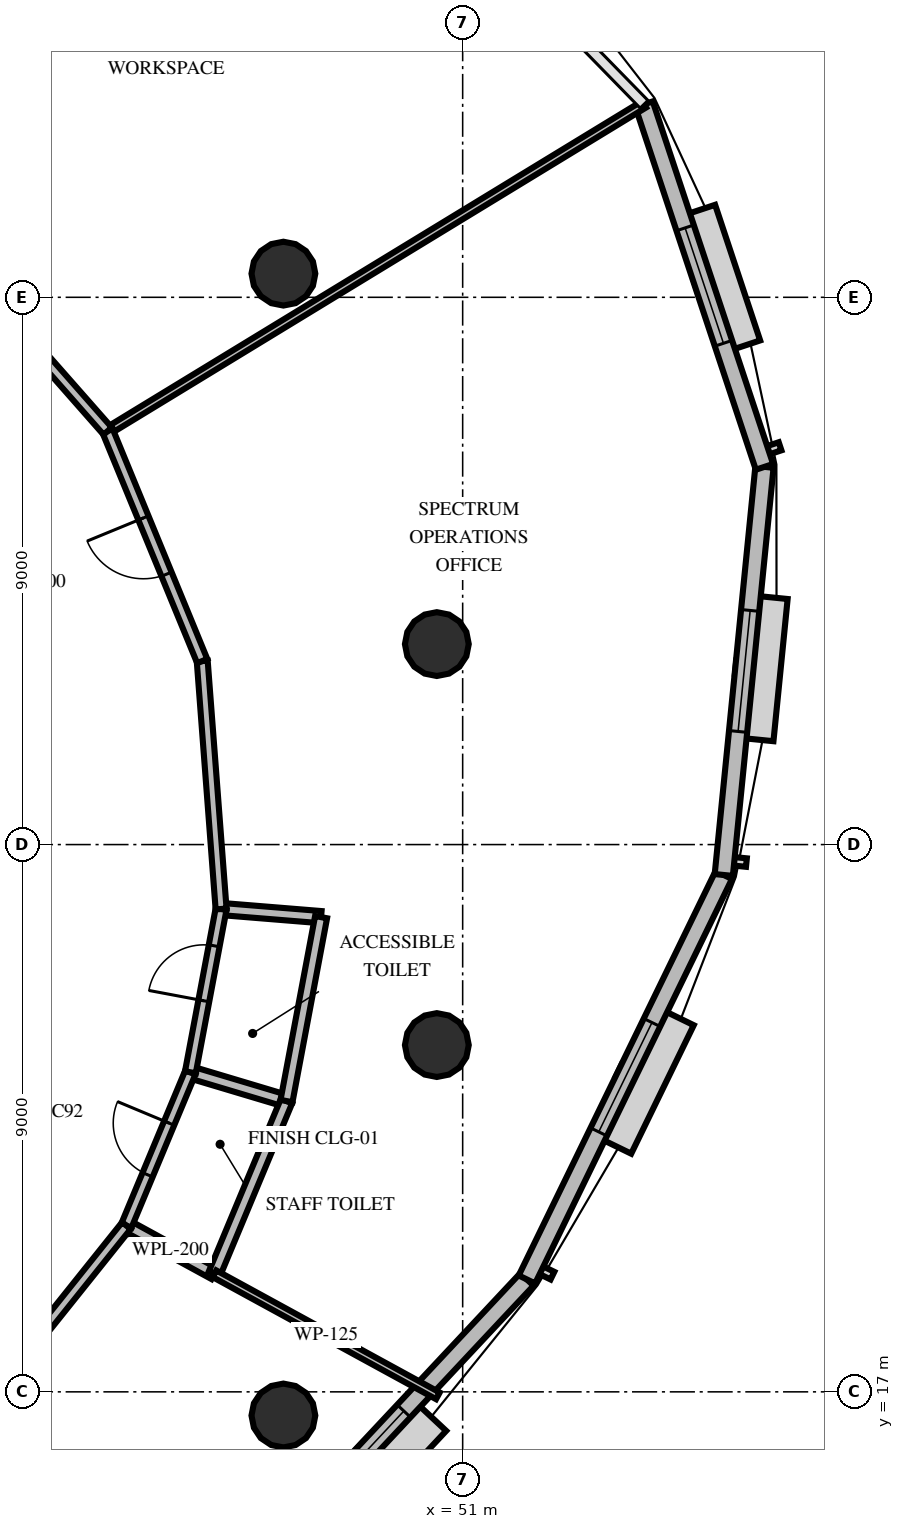
"""IFC4 building model, lengths in metres.
Left out: names, types, materials, properties, quantities, classifications, styles, units other than length and angle.
Written with IfcOpenShell. Run it as: python <this file> out.ifc"""

import sys

from ifc_helpers import new_model, si_unit, direction, frame, frame_2d, origin, origin_2d, place, context, subcontext, project, spatial, rectangle, circle, extrude, element, fill, save


model = new_model("IFC4")
c1 = context("Model", 3, precision=1e-05, world=origin(), true_north=direction((0.0, 1.0)))
c2 = subcontext(c1, "Body", "Model", "MODEL_VIEW")
j1 = project(units=[si_unit("LENGTHUNIT", "METRE"), si_unit("PLANEANGLEUNIT", "RADIAN")], contexts=[c1])
p1 = place(None, origin())
s1 = spatial("IfcSite", under=j1, at=p1, CompositionType="ELEMENT")
p2 = place(p1, origin())
s2 = spatial("IfcBuilding", under=s1, at=p2, CompositionType="ELEMENT")
p3 = place(p2, frame((0.0, 0.0, 166.4)))
s3 = spatial("IfcBuildingStorey", under=s2, at=p3, CompositionType="ELEMENT", Elevation=166.4)
for number, where, z_axis, x_axis in (
    (1, (50.575, 29.297, 0.0), (0.0, 0.0, 1.0), (1.0, 0.0, 0.0)),
    (2, (48.052, 35.389, 0.0), (0.0, 0.0, 1.0), (1.0, 0.0, 0.0)),
    (3, (48.052, 16.611, 0.0), (0.0, 0.0, 1.0), (1.0, 0.0, 0.0)),
    (4, (50.575, 22.703, 0.0), (0.0, 0.0, 1.0), (1.0, 0.0, 0.0)),
):
    element("IfcColumn", number, at=place(p3, frame(where, z_axis=z_axis, x_axis=x_axis)), inside=s3, PredefinedType="COLUMN", context=c2, shape_type="SweptSolid", body=[
        extrude(circle(Radius=0.525, at=origin_2d()), origin(), (0.0, 0.0, 1.0), 3.6),
    ])
p4 = place(p3, frame((46.641, 13.06, 0.0), z_axis=(0.0, 0.0, 1.0), x_axis=(0.683169314715, 0.730260013579, 0.0)))
e5 = element("IfcWall", 5, at=p4, inside=s3, PredefinedType="SOLIDWALL", context=c2, shape_type="SweptSolid", body=[
    extrude(rectangle(XDim=7.927, YDim=0.3, at=frame_2d((3.963, 0.0))), origin(), (0.0, 0.0, 1.0), 2.66),
])
p5 = place(p4, frame((2.964, 0.0, 0.8)))
e6 = element("IfcOpeningElement", 6, at=p5, cuts=e5, PredefinedType="OPENING", context=c2, shape_type="SweptSolid", body=[
    extrude(rectangle(XDim=2.0, YDim=1.85, at=frame_2d((1.0, 0.925))), frame((0.0, 0.16, 0.0), z_axis=(0.0, -1.0, 0.0), x_axis=(1.0, 0.0, 0.0)), (0.0, 0.0, 1.0), 0.32),
])
p6 = place(p3, frame((52.057, 18.848, 0.0), z_axis=(0.0, 0.0, 1.0), x_axis=(0.437643860452, 0.89914840344, 0.0)))
e7 = element("IfcWall", 7, at=p6, inside=s3, PredefinedType="SOLIDWALL", context=c2, shape_type="SweptSolid", body=[
    extrude(rectangle(XDim=7.398, YDim=0.3, at=frame_2d((3.699, 0.0))), origin(), (0.0, 0.0, 1.0), 2.66),
])
p7 = place(p6, frame((2.699, 0.0, 0.8)))
e8 = element("IfcOpeningElement", 8, at=p7, cuts=e7, PredefinedType="OPENING", context=c2, shape_type="SweptSolid", body=[
    extrude(rectangle(XDim=2.0, YDim=1.85, at=frame_2d((1.0, 0.925))), frame((0.0, 0.16, 0.0), z_axis=(0.0, -1.0, 0.0), x_axis=(1.0, 0.0, 0.0)), (0.0, 0.0, 1.0), 0.32),
])
p8 = place(p3, frame((55.294, 25.5, 0.0), z_axis=(0.0, 0.0, 1.0), x_axis=(0.099213429468, 0.995066176399, 0.0)))
e9 = element("IfcWall", 9, at=p8, inside=s3, PredefinedType="SOLIDWALL", context=c2, shape_type="SweptSolid", body=[
    extrude(rectangle(XDim=6.745, YDim=0.3, at=frame_2d((3.373, 0.0))), origin(), (0.0, 0.0, 1.0), 2.66),
])
p9 = place(p8, frame((2.372, 0.0, 0.8)))
e10 = element("IfcOpeningElement", 10, at=p9, cuts=e9, PredefinedType="OPENING", context=c2, shape_type="SweptSolid", body=[
    extrude(rectangle(XDim=2.0, YDim=1.85, at=frame_2d((1.0, 0.925))), frame((0.0, 0.16, 0.0), z_axis=(0.0, -1.0, 0.0), x_axis=(1.0, 0.0, 0.0)), (0.0, 0.0, 1.0), 0.32),
])
p10 = place(p3, frame((55.964, 32.212, 0.0), z_axis=(0.0, 0.0, 1.0), x_axis=(-0.315143404038, 0.949044063725, 0.0)))
e11 = element("IfcWall", 11, at=p10, inside=s3, PredefinedType="SOLIDWALL", context=c2, shape_type="SweptSolid", body=[
    extrude(rectangle(XDim=6.283, YDim=0.3, at=frame_2d((3.141, 0.0))), origin(), (0.0, 0.0, 1.0), 2.66),
])
p11 = place(p10, frame((2.141, 0.0, 0.8)))
e12 = element("IfcOpeningElement", 12, at=p11, cuts=e11, PredefinedType="OPENING", context=c2, shape_type="SweptSolid", body=[
    extrude(rectangle(XDim=2.0, YDim=1.85, at=frame_2d((1.0, 0.925))), frame((0.0, 0.16, 0.0), z_axis=(0.0, -1.0, 0.0), x_axis=(1.0, 0.0, 0.0)), (0.0, 0.0, 1.0), 0.32),
])
for number, where, z_axis, x_axis in (
    (13, (45.47, 19.733, 0.0), (0.0, 0.0, 1.0), (0.878, -0.479, 0.0)),
    (14, (46.522, 22.255, 0.0), (0.0, 0.0, 1.0), (0.958, -0.286, 0.0)),
):
    element("IfcWall", number, at=place(p3, frame(where, z_axis=z_axis, x_axis=x_axis)), inside=s3, PredefinedType="PLUMBINGWALL", context=c2, shape_type="SweptSolid", body=[
        extrude(rectangle(XDim=1.65, YDim=0.2, at=frame_2d((0.825, 0.0))), origin(), (0.0, 0.0, 1.0), 2.46),
    ])
p12 = place(p3, frame((46.918, 18.942, 0.0), z_axis=(0.0, 0.0, 1.0), x_axis=(0.385082884219, 0.922881992609, 0.0)))
e15 = element("IfcWall", 15, at=p12, inside=s3, PredefinedType="PLUMBINGWALL", context=c2, shape_type="SweptSolid", body=[
    extrude(rectangle(XDim=3.077, YDim=0.2, at=frame_2d((1.539, 0.0))), origin(), (0.0, 0.0, 1.0), 2.46),
])
p13 = place(p3, frame((45.47, 19.733, 0.0), z_axis=(0.0, 0.0, 1.0), x_axis=(0.385091152841, 0.92287854239, 0.0)))
e16 = element("IfcWall", 16, at=p13, inside=s3, PredefinedType="PARTITIONING", context=c2, shape_type="SweptSolid", body=[
    extrude(rectangle(XDim=2.732, YDim=0.18, at=frame_2d((1.366, 0.0))), origin(), (0.0, 0.0, 1.0), 2.46),
])
p14 = place(p13, frame((0.906, 0.0, 0.0)))
e17 = element("IfcOpeningElement", 17, at=p14, cuts=e16, PredefinedType="OPENING", context=c2, shape_type="SweptSolid", body=[
    extrude(rectangle(XDim=0.92, YDim=2.1, at=frame_2d((0.46, 1.05))), frame((0.0, 0.1, 0.0), z_axis=(0.0, -1.0, 0.0), x_axis=(1.0, 0.0, 0.0)), (0.0, 0.0, 1.0), 0.2),
])
p15 = place(p3, frame((47.027, 24.94, 0.0), z_axis=(0.0, 0.0, 1.0), x_axis=(0.99670613325, -0.081097989758, 0.0)))
e18 = element("IfcWall", 18, at=p15, inside=s3, PredefinedType="PLUMBINGWALL", context=c2, shape_type="SweptSolid", body=[
    extrude(rectangle(XDim=1.65, YDim=0.2, at=frame_2d((0.825, 0.0))), origin(), (0.0, 0.0, 1.0), 2.46),
])
p16 = place(p3, frame((48.103, 21.782, 0.0), z_axis=(0.0, 0.0, 1.0), x_axis=(0.184781914285, 0.98277955013, 0.0)))
e19 = element("IfcWall", 19, at=p16, inside=s3, PredefinedType="PLUMBINGWALL", context=c2, shape_type="SweptSolid", body=[
    extrude(rectangle(XDim=3.077, YDim=0.2, at=frame_2d((1.539, 0.0))), origin(), (0.0, 0.0, 1.0), 2.46),
])
p17 = place(p3, frame((46.522, 22.255, 0.0), z_axis=(0.0, 0.0, 1.0), x_axis=(0.184865739827, 0.982763785575, 0.0)))
e20 = element("IfcWall", 20, at=p17, inside=s3, PredefinedType="PARTITIONING", context=c2, shape_type="SweptSolid", body=[
    extrude(rectangle(XDim=2.732, YDim=0.18, at=frame_2d((1.366, 0.0))), origin(), (0.0, 0.0, 1.0), 2.46),
])
p18 = place(p17, frame((1.197, 0.0, 0.0)))
e21 = element("IfcOpeningElement", 21, at=p18, cuts=e20, PredefinedType="OPENING", context=c2, shape_type="SweptSolid", body=[
    extrude(rectangle(XDim=0.92, YDim=2.1, at=frame_2d((0.46, 1.05))), frame((0.0, 0.1, 0.0), z_axis=(0.0, -1.0, 0.0), x_axis=(1.0, 0.0, 0.0)), (0.0, 0.0, 1.0), 0.2),
])
p19 = place(p3, frame((46.918, 18.942, 0.0), z_axis=(0.0, 0.0, 1.0), x_axis=(0.877567812502, -0.479452536191, 0.0)))
e22 = element("IfcWall", 22, at=p19, inside=s3, PredefinedType="PARTITIONING", context=c2, shape_type="SweptSolid", body=[
    extrude(rectangle(XDim=4.187, YDim=0.125, at=frame_2d((2.094, 0.0))), origin(), (0.0, 0.0, 1.0), 2.46),
])
p20 = place(p3, frame((45.162, 32.8, 0.0), z_axis=(0.0, 0.0, 1.0), x_axis=(0.853994943422, 0.520281305266, 0.0)))
e23 = element("IfcWall", 23, at=p20, inside=s3, PredefinedType="PARTITIONING", context=c2, shape_type="SweptSolid", body=[
    extrude(rectangle(XDim=10.33, YDim=0.125, at=frame_2d((5.165, 0.0))), origin(), (0.0, 0.0, 1.0), 2.46),
])
p21 = place(p3, frame((47.027, 24.94, 0.0), z_axis=(0.0, 0.0, 1.0), x_axis=(-0.075883796474, 0.997116667914, 0.0)))
e24 = element("IfcWall", 24, at=p21, inside=s3, PredefinedType="PARTITIONING", context=c2, shape_type="SweptSolid", body=[
    extrude(rectangle(XDim=4.089, YDim=0.18, at=frame_2d((2.044, 0.0))), origin(), (0.0, 0.0, 1.0), 2.46),
])
p22 = place(p3, frame((46.717, 29.018, 0.0), z_axis=(0.0, 0.0, 1.0), x_axis=(-0.380257278333, 0.9248807503, 0.0)))
e25 = element("IfcWall", 25, at=p22, inside=s3, PredefinedType="PARTITIONING", context=c2, shape_type="SweptSolid", body=[
    extrude(rectangle(XDim=4.089, YDim=0.18, at=frame_2d((2.044, 0.0))), origin(), (0.0, 0.0, 1.0), 2.46),
])
p23 = place(p22, frame((1.545, 0.0, 0.0)))
e26 = element("IfcOpeningElement", 26, at=p23, cuts=e25, PredefinedType="OPENING", context=c2, shape_type="SweptSolid", body=[
    extrude(rectangle(XDim=1.0, YDim=2.15, at=frame_2d((0.5, 1.075))), frame((0.0, 0.1, 0.0), z_axis=(0.0, -1.0, 0.0), x_axis=(1.0, 0.0, 0.0)), (0.0, 0.0, 1.0), 0.2),
])
p24 = place(p3, frame((45.162, 32.8, 0.0), z_axis=(0.0, 0.0, 1.0), x_axis=(-0.660626682452, 0.750714583869, 0.0)))
e27 = element("IfcWall", 27, at=p24, inside=s3, PredefinedType="PARTITIONING", context=c2, shape_type="SweptSolid", body=[
    extrude(rectangle(XDim=4.539, YDim=0.18, at=frame_2d((2.27, 0.0))), origin(), (0.0, 0.0, 1.0), 2.46),
])
p25 = place(p24, frame((2.467, 0.0, 0.0)))
e28 = element("IfcOpeningElement", 28, at=p25, cuts=e27, PredefinedType="OPENING", context=c2, shape_type="SweptSolid", body=[
    extrude(rectangle(XDim=1.15, YDim=2.15, at=frame_2d((0.575, 1.075))), frame((0.0, 0.1, 0.0), z_axis=(0.0, -1.0, 0.0), x_axis=(1.0, 0.0, 0.0)), (0.0, 0.0, 1.0), 0.2),
])
p26 = place(p3, frame((42.635, 16.188, 0.0), z_axis=(0.0, 0.0, 1.0), x_axis=(0.6245638532, 0.780973746854, 0.0)))
e29 = element("IfcWall", 29, at=p26, inside=s3, PredefinedType="PARTITIONING", context=c2, shape_type="SweptSolid", body=[
    extrude(rectangle(XDim=4.539, YDim=0.18, at=frame_2d((2.27, 0.0))), origin(), (0.0, 0.0, 1.0), 2.46),
])
p27 = place(p5, origin())
e30 = element("IfcWindow", 30, at=p27, inside=s3, PartitioningType="SINGLE_PANEL", PredefinedType="WINDOW", context=c2, shape_type="SweptSolid", body=[
    extrude(rectangle(XDim=2.0, YDim=1.85, at=frame_2d((1.0, 0.925))), frame((0.0, 0.03, 0.0), z_axis=(0.0, -1.0, 0.0), x_axis=(1.0, 0.0, 0.0)), (0.0, 0.0, 1.0), 0.06),
])
fill(e6, e30)
p28 = place(p7, origin())
e31 = element("IfcWindow", 31, at=p28, inside=s3, PartitioningType="SINGLE_PANEL", PredefinedType="WINDOW", context=c2, shape_type="SweptSolid", body=[
    extrude(rectangle(XDim=2.0, YDim=1.85, at=frame_2d((1.0, 0.925))), frame((0.0, 0.03, 0.0), z_axis=(0.0, -1.0, 0.0), x_axis=(1.0, 0.0, 0.0)), (0.0, 0.0, 1.0), 0.06),
])
fill(e8, e31)
p29 = place(p9, origin())
e32 = element("IfcWindow", 32, at=p29, inside=s3, PartitioningType="SINGLE_PANEL", PredefinedType="WINDOW", context=c2, shape_type="SweptSolid", body=[
    extrude(rectangle(XDim=2.0, YDim=1.85, at=frame_2d((1.0, 0.925))), frame((0.0, 0.03, 0.0), z_axis=(0.0, -1.0, 0.0), x_axis=(1.0, 0.0, 0.0)), (0.0, 0.0, 1.0), 0.06),
])
fill(e10, e32)
p30 = place(p11, origin())
e33 = element("IfcWindow", 33, at=p30, inside=s3, PartitioningType="SINGLE_PANEL", PredefinedType="WINDOW", context=c2, shape_type="SweptSolid", body=[
    extrude(rectangle(XDim=2.0, YDim=1.85, at=frame_2d((1.0, 0.925))), frame((0.0, 0.03, 0.0), z_axis=(0.0, -1.0, 0.0), x_axis=(1.0, 0.0, 0.0)), (0.0, 0.0, 1.0), 0.06),
])
fill(e12, e33)
p31 = place(p14, origin())
e34 = element("IfcDoor", 34, at=p31, inside=s3, OperationType="SINGLE_SWING_RIGHT", PredefinedType="DOOR", context=c2, shape_type="SweptSolid", body=[
    extrude(rectangle(XDim=0.92, YDim=2.1, at=frame_2d((0.46, 1.05))), frame((0.0, 0.025, 0.0), z_axis=(0.0, -1.0, 0.0), x_axis=(1.0, 0.0, 0.0)), (0.0, 0.0, 1.0), 0.05),
])
fill(e17, e34)
p32 = place(p18, origin())
e35 = element("IfcDoor", 35, at=p32, inside=s3, OperationType="SINGLE_SWING_LEFT", PredefinedType="DOOR", context=c2, shape_type="SweptSolid", body=[
    extrude(rectangle(XDim=0.92, YDim=2.1, at=frame_2d((0.46, 1.05))), frame((0.0, 0.025, 0.0), z_axis=(0.0, -1.0, 0.0), x_axis=(1.0, 0.0, 0.0)), (0.0, 0.0, 1.0), 0.05),
])
fill(e21, e35)
p33 = place(p23, origin())
e36 = element("IfcDoor", 36, at=p33, inside=s3, OperationType="SINGLE_SWING_RIGHT", PredefinedType="DOOR", context=c2, shape_type="SweptSolid", body=[
    extrude(rectangle(XDim=1.0, YDim=2.15, at=frame_2d((0.5, 1.075))), frame((0.0, 0.025, 0.0), z_axis=(0.0, -1.0, 0.0), x_axis=(1.0, 0.0, 0.0)), (0.0, 0.0, 1.0), 0.05),
])
fill(e26, e36)
save(model, sys.argv[1])
